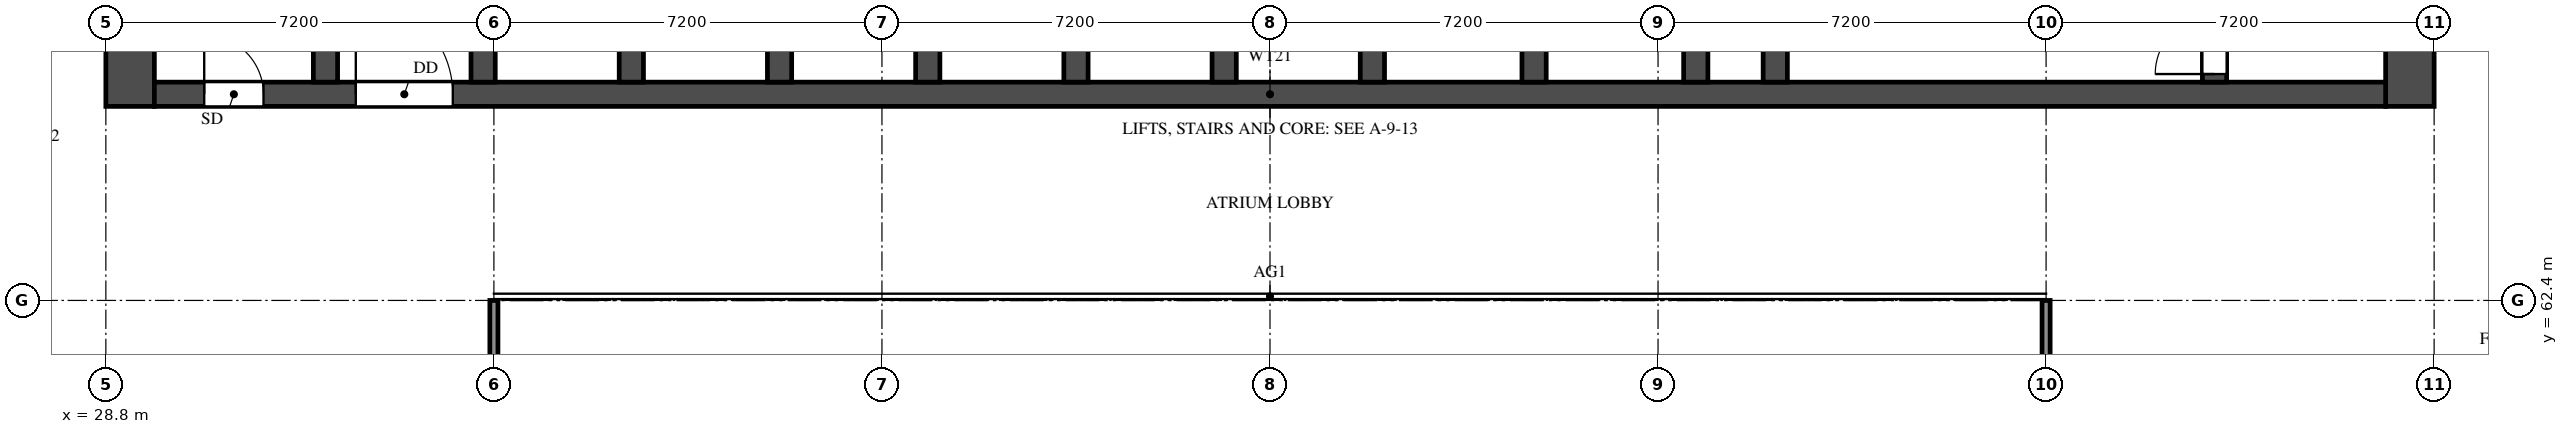
"""IFC4 building model, lengths in metres.
Left out: names, types, materials, properties, quantities, classifications, styles, units other than length and angle.
Written with IfcOpenShell. Run it as: python <this file> out.ifc"""

import sys

from ifc_helpers import new_model, si_unit, direction, frame, frame_2d, origin, place, context, subcontext, project, spatial, rectangle, extrude, element, fill, save


model = new_model("IFC4")
c1 = context("Model", 3, precision=1e-05, world=origin(), true_north=direction((0.0, 1.0)))
c2 = subcontext(c1, "Body", "Model", "MODEL_VIEW")
j1 = project(units=[si_unit("LENGTHUNIT", "METRE"), si_unit("PLANEANGLEUNIT", "RADIAN")], contexts=[c1])
p1 = place(None, origin())
s1 = spatial("IfcSite", under=j1, at=p1, CompositionType="ELEMENT")
p2 = place(p1, origin())
s2 = spatial("IfcBuilding", under=s1, at=p2, CompositionType="ELEMENT")
p3 = place(p2, frame((0.0, 0.0, 90.0)))
s3 = spatial("IfcBuildingStorey", under=s2, at=p3, CompositionType="ELEMENT", Elevation=90.0)
for number, where, z_axis, x_axis in (
    (1, (29.25, 66.0, 0.0), (0.0, 0.0, 1.0), (0.0, 1.0, 0.0)),
    (2, (71.55, 66.0, 0.0), (0.0, 0.0, 1.0), (0.0, 1.0, 0.0)),
):
    element("IfcWall", number, at=place(p3, frame(where, z_axis=z_axis, x_axis=x_axis)), inside=s3, PredefinedType="SHEAR", context=c2, shape_type="SweptSolid", body=[
        extrude(rectangle(XDim=12.0, YDim=0.9, at=frame_2d((6.0, 0.0))), origin(), (0.0, 0.0, 1.0), 3.18),
    ])
p4 = place(p3, frame((29.7, 66.225, 0.0), z_axis=(0.0, 0.0, 1.0), x_axis=(1.0, 0.0, 0.0)))
e3 = element("IfcWall", 3, at=p4, inside=s3, PredefinedType="SHEAR", context=c2, shape_type="SweptSolid", body=[
    extrude(rectangle(XDim=41.4, YDim=0.45, at=frame_2d((20.7, 0.0))), origin(), (0.0, 0.0, 1.0), 3.18),
])
p5 = place(p4, frame((0.925, 0.0, 0.0)))
e4 = element("IfcOpeningElement", 4, at=p5, cuts=e3, PredefinedType="OPENING", context=c2, shape_type="SweptSolid", body=[
    extrude(rectangle(XDim=1.1, YDim=2.1, at=frame_2d((0.55, 1.05))), frame((0.0, 0.235, 0.0), z_axis=(0.0, -1.0, 0.0), x_axis=(1.0, 0.0, 0.0)), (0.0, 0.0, 1.0), 0.47),
])
p6 = place(p4, frame((3.738, 0.0, 0.0)))
e5 = element("IfcOpeningElement", 5, at=p6, cuts=e3, PredefinedType="OPENING", context=c2, shape_type="SweptSolid", body=[
    extrude(rectangle(XDim=1.8, YDim=2.1, at=frame_2d((0.9, 1.05))), frame((0.0, 0.235, 0.0), z_axis=(0.0, -1.0, 0.0), x_axis=(1.0, 0.0, 0.0)), (0.0, 0.0, 1.0), 0.47),
])
p7 = place(p3, frame((32.875, 66.45, 0.0), z_axis=(0.0, 0.0, 1.0), x_axis=(0.0, 1.0, 0.0)))
e6 = element("IfcWall", 6, at=p7, inside=s3, PredefinedType="SHEAR", context=c2, shape_type="SweptSolid", body=[
    extrude(rectangle(XDim=10.65, YDim=0.45, at=frame_2d((5.325, 0.0))), origin(), (0.0, 0.0, 1.0), 3.18),
])
p8 = place(p3, frame((67.925, 66.45, 0.0), z_axis=(0.0, 0.0, 1.0), x_axis=(0.0, 1.0, 0.0)))
e7 = element("IfcWall", 7, at=p8, inside=s3, PredefinedType="SHEAR", context=c2, shape_type="SweptSolid", body=[
    extrude(rectangle(XDim=10.65, YDim=0.45, at=frame_2d((5.325, 0.0))), origin(), (0.0, 0.0, 1.0), 3.18),
])
p9 = place(p8, frame((0.15, 0.0, 0.0)))
e8 = element("IfcOpeningElement", 8, at=p9, cuts=e7, PredefinedType="OPENING", context=c2, shape_type="SweptSolid", body=[
    extrude(rectangle(XDim=1.1, YDim=2.1, at=frame_2d((0.55, 1.05))), frame((0.0, 0.235, 0.0), z_axis=(0.0, -1.0, 0.0), x_axis=(1.0, 0.0, 0.0)), (0.0, 0.0, 1.0), 0.47),
])
p10 = place(p3, frame((59.775, 66.45, 0.0), z_axis=(0.0, 0.0, 1.0), x_axis=(0.0, 1.0, 0.0)))
e9 = element("IfcWall", 9, at=p10, inside=s3, PredefinedType="SHEAR", context=c2, shape_type="SweptSolid", body=[
    extrude(rectangle(XDim=6.025, YDim=0.45, at=frame_2d((3.013, 0.0))), origin(), (0.0, 0.0, 1.0), 3.18),
])
p11 = place(p10, frame((3.85, 0.0, 0.0)))
e10 = element("IfcOpeningElement", 10, at=p11, cuts=e9, PredefinedType="OPENING", context=c2, shape_type="SweptSolid", body=[
    extrude(rectangle(XDim=1.2, YDim=2.1, at=frame_2d((0.6, 1.05))), frame((0.0, 0.235, 0.0), z_axis=(0.0, -1.0, 0.0), x_axis=(1.0, 0.0, 0.0)), (0.0, 0.0, 1.0), 0.47),
])
for number, where, z_axis, x_axis in (
    (11, (35.8, 66.45, 0.0), (0.0, 0.0, 1.0), (0.0, 1.0, 0.0)),
    (12, (38.55, 66.45, 0.0), (0.0, 0.0, 1.0), (0.0, 1.0, 0.0)),
    (13, (41.3, 66.45, 0.0), (0.0, 0.0, 1.0), (0.0, 1.0, 0.0)),
    (14, (44.05, 66.45, 0.0), (0.0, 0.0, 1.0), (0.0, 1.0, 0.0)),
    (15, (46.8, 66.45, 0.0), (0.0, 0.0, 1.0), (0.0, 1.0, 0.0)),
    (16, (49.55, 66.45, 0.0), (0.0, 0.0, 1.0), (0.0, 1.0, 0.0)),
    (17, (52.3, 66.45, 0.0), (0.0, 0.0, 1.0), (0.0, 1.0, 0.0)),
    (18, (55.3, 66.45, 0.0), (0.0, 0.0, 1.0), (0.0, 1.0, 0.0)),
    (19, (58.3, 66.45, 0.0), (0.0, 0.0, 1.0), (0.0, 1.0, 0.0)),
):
    element("IfcWall", number, at=place(p3, frame(where, z_axis=z_axis, x_axis=x_axis)), inside=s3, PredefinedType="SHEAR", context=c2, shape_type="SweptSolid", body=[
        extrude(rectangle(XDim=2.425, YDim=0.45, at=frame_2d((1.212, 0.0))), origin(), (0.0, 0.0, 1.0), 3.18),
    ])
for number, where, z_axis, x_axis in (
    (20, (36.0, 48.0, 0.0), (0.0, 0.0, 1.0), (0.0, 1.0, 0.0)),
    (21, (64.8, 48.0, 0.0), (0.0, 0.0, 1.0), (0.0, 1.0, 0.0)),
):
    element("IfcWall", number, at=place(p3, frame(where, z_axis=z_axis, x_axis=x_axis)), inside=s3, PredefinedType="SOLIDWALL", context=c2, shape_type="SweptSolid", body=[
        extrude(rectangle(XDim=14.4, YDim=0.15, at=frame_2d((7.2, 0.0))), origin(), (0.0, 0.0, 1.0), 2.28),
    ])
p12 = place(p5, origin())
e22 = element("IfcDoor", 22, at=p12, inside=s3, OperationType="SINGLE_SWING_LEFT", PredefinedType="DOOR", context=c2, shape_type="SweptSolid", body=[
    extrude(rectangle(XDim=1.1, YDim=2.1, at=frame_2d((0.55, 1.05))), frame((0.0, 0.025, 0.0), z_axis=(0.0, -1.0, 0.0), x_axis=(1.0, 0.0, 0.0)), (0.0, 0.0, 1.0), 0.05),
])
fill(e4, e22)
p13 = place(p9, origin())
e23 = element("IfcDoor", 23, at=p13, inside=s3, OperationType="SINGLE_SWING_LEFT", PredefinedType="DOOR", context=c2, shape_type="SweptSolid", body=[
    extrude(rectangle(XDim=1.1, YDim=2.1, at=frame_2d((0.55, 1.05))), frame((0.0, 0.025, 0.0), z_axis=(0.0, -1.0, 0.0), x_axis=(1.0, 0.0, 0.0)), (0.0, 0.0, 1.0), 0.05),
])
fill(e8, e23)
p14 = place(p6, origin())
e24 = element("IfcDoor", 24, at=p14, inside=s3, OperationType="DOUBLE_DOOR_SINGLE_SWING", PredefinedType="DOOR", context=c2, shape_type="SweptSolid", body=[
    extrude(rectangle(XDim=1.8, YDim=2.1, at=frame_2d((0.9, 1.05))), frame((0.0, 0.025, 0.0), z_axis=(0.0, -1.0, 0.0), x_axis=(1.0, 0.0, 0.0)), (0.0, 0.0, 1.0), 0.05),
])
fill(e5, e24)
save(model, sys.argv[1])
